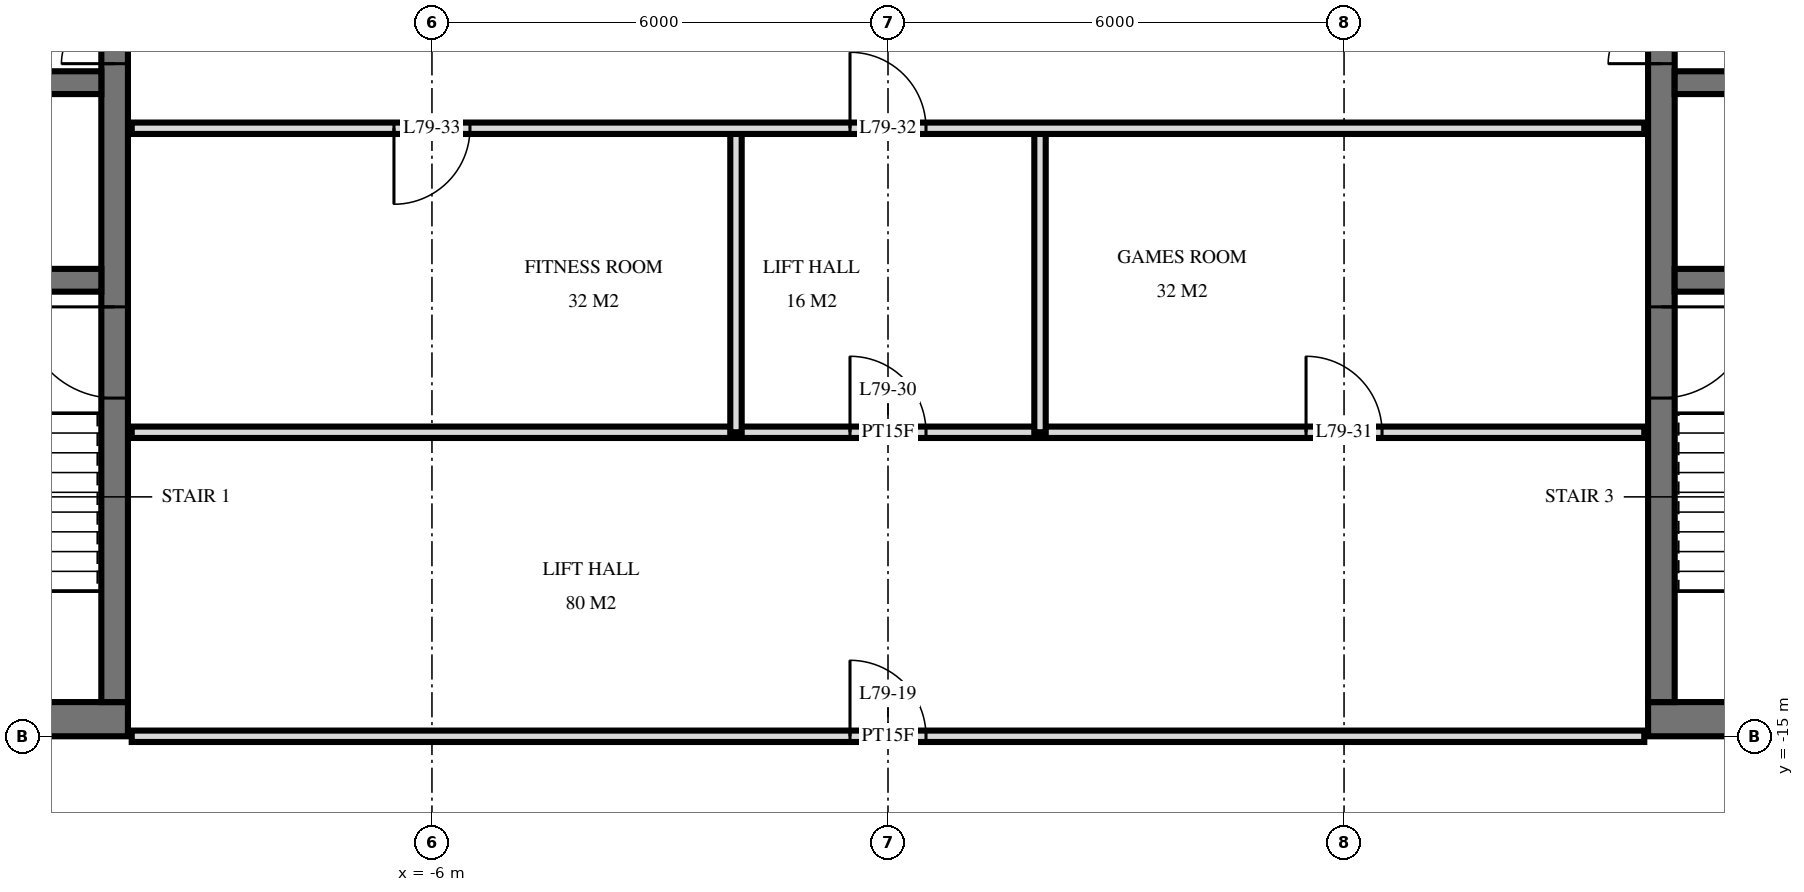
"""IFC4 building model, lengths in metres.
Left out: names, types, materials, properties, quantities, classifications, styles, units other than length and angle.
Written with IfcOpenShell. Run it as: python <this file> out.ifc"""

import sys

from ifc_helpers import new_model, si_unit, direction, frame, frame_2d, origin, place, context, subcontext, project, spatial, rectangle, extrude, element, fill, save


model = new_model("IFC4")
c1 = context("Model", 3, precision=1e-05, world=origin(), true_north=direction((0.0, 1.0)))
c2 = subcontext(c1, "Body", "Model", "MODEL_VIEW")
j1 = project(units=[si_unit("LENGTHUNIT", "METRE"), si_unit("PLANEANGLEUNIT", "RADIAN")], contexts=[c1])
p1 = place(None, origin())
s1 = spatial("IfcSite", under=j1, at=p1, CompositionType="ELEMENT")
p2 = place(p1, origin())
s2 = spatial("IfcBuilding", under=s1, at=p2, CompositionType="ELEMENT")
p3 = place(p2, frame((0.0, 0.0, 298.1)))
s3 = spatial("IfcBuildingStorey", under=s2, at=p3, CompositionType="ELEMENT", Elevation=298.1)
p4 = place(p3, frame((-19.5, -14.775, 0.0), z_axis=(0.0, 0.0, 1.0), x_axis=(1.0, 0.0, 0.0)))
e1 = element("IfcWall", 1, at=p4, inside=s3, PredefinedType="SHEAR", context=c2, shape_type="SweptSolid", body=[
    extrude(rectangle(XDim=9.5, YDim=0.45, at=frame_2d((4.75, 0.0))), origin(), (0.0, 0.0, 1.0), 3.5),
])
p5 = place(p4, frame((1.2, 0.0, 0.0)))
e2 = element("IfcOpeningElement", 2, at=p5, cuts=e1, PredefinedType="OPENING", context=c2, shape_type="SweptSolid", body=[
    extrude(rectangle(XDim=1.2, YDim=2.1, at=frame_2d((0.6, 1.05))), frame((0.0, 0.235, 0.0), z_axis=(0.0, -1.0, 0.0), x_axis=(1.0, 0.0, 0.0)), (0.0, 0.0, 1.0), 0.47),
])
p6 = place(p4, frame((4.25, 0.0, 0.0)))
e3 = element("IfcOpeningElement", 3, at=p6, cuts=e1, PredefinedType="OPENING", context=c2, shape_type="SweptSolid", body=[
    extrude(rectangle(XDim=1.1, YDim=2.1, at=frame_2d((0.55, 1.05))), frame((0.0, 0.235, 0.0), z_axis=(0.0, -1.0, 0.0), x_axis=(1.0, 0.0, 0.0)), (0.0, 0.0, 1.0), 0.47),
])
p7 = place(p3, frame((-10.175, -14.55, 0.0), z_axis=(0.0, 0.0, 1.0), x_axis=(0.0, 1.0, 0.0)))
e4 = element("IfcWall", 4, at=p7, inside=s3, PredefinedType="SHEAR", context=c2, shape_type="SweptSolid", body=[
    extrude(rectangle(XDim=14.1, YDim=0.35, at=frame_2d((7.05, 0.0))), origin(), (0.0, 0.0, 1.0), 3.5),
])
p8 = place(p7, frame((8.4, 0.0, 0.0)))
e5 = element("IfcOpeningElement", 5, at=p8, cuts=e4, PredefinedType="OPENING", context=c2, shape_type="SweptSolid", body=[
    extrude(rectangle(XDim=1.4, YDim=2.4, at=frame_2d((0.7, 1.2))), frame((0.0, 0.185, 0.0), z_axis=(0.0, -1.0, 0.0), x_axis=(1.0, 0.0, 0.0)), (0.0, 0.0, 1.0), 0.37),
])
p9 = place(p7, frame((10.0, 0.0, 0.0)))
e6 = element("IfcOpeningElement", 6, at=p9, cuts=e4, PredefinedType="OPENING", context=c2, shape_type="SweptSolid", body=[
    extrude(rectangle(XDim=1.4, YDim=2.4, at=frame_2d((0.7, 1.2))), frame((0.0, 0.185, 0.0), z_axis=(0.0, -1.0, 0.0), x_axis=(1.0, 0.0, 0.0)), (0.0, 0.0, 1.0), 0.37),
])
p10 = place(p7, frame((4.0, 0.0, 0.0)))
e7 = element("IfcOpeningElement", 7, at=p10, cuts=e4, PredefinedType="OPENING", context=c2, shape_type="SweptSolid", body=[
    extrude(rectangle(XDim=1.2, YDim=2.1, at=frame_2d((0.6, 1.05))), frame((0.0, 0.185, 0.0), z_axis=(0.0, -1.0, 0.0), x_axis=(1.0, 0.0, 0.0)), (0.0, 0.0, 1.0), 0.37),
])
p11 = place(p3, frame((-19.05, -6.4, 0.0), z_axis=(0.0, 0.0, 1.0), x_axis=(1.0, 0.0, 0.0)))
e8 = element("IfcWall", 8, at=p11, inside=s3, PredefinedType="SHEAR", context=c2, shape_type="SweptSolid", body=[
    extrude(rectangle(XDim=8.7, YDim=0.3, at=frame_2d((4.35, 0.0))), origin(), (0.0, 0.0, 1.0), 3.5),
])
p12 = place(p11, frame((0.8, 0.0, 0.0)))
e9 = element("IfcOpeningElement", 9, at=p12, cuts=e8, PredefinedType="OPENING", context=c2, shape_type="SweptSolid", body=[
    extrude(rectangle(XDim=1.1, YDim=2.1, at=frame_2d((0.55, 1.05))), frame((0.0, 0.16, 0.0), z_axis=(0.0, -1.0, 0.0), x_axis=(1.0, 0.0, 0.0)), (0.0, 0.0, 1.0), 0.32),
])
p13 = place(p3, frame((-19.05, -9.0, 0.0), z_axis=(0.0, 0.0, 1.0), x_axis=(1.0, 0.0, 0.0)))
e10 = element("IfcWall", 10, at=p13, inside=s3, PredefinedType="SHEAR", context=c2, shape_type="SweptSolid", body=[
    extrude(rectangle(XDim=8.7, YDim=0.3, at=frame_2d((4.35, 0.0))), origin(), (0.0, 0.0, 1.0), 3.5),
])
p14 = place(p13, frame((3.8, 0.0, 0.0)))
e11 = element("IfcOpeningElement", 11, at=p14, cuts=e10, PredefinedType="OPENING", context=c2, shape_type="SweptSolid", body=[
    extrude(rectangle(XDim=1.1, YDim=2.1, at=frame_2d((0.55, 1.05))), frame((0.0, 0.16, 0.0), z_axis=(0.0, -1.0, 0.0), x_axis=(1.0, 0.0, 0.0)), (0.0, 0.0, 1.0), 0.32),
])
p15 = place(p3, frame((10.0, -14.775, 0.0), z_axis=(0.0, 0.0, 1.0), x_axis=(1.0, 0.0, 0.0)))
e12 = element("IfcWall", 12, at=p15, inside=s3, PredefinedType="SHEAR", context=c2, shape_type="SweptSolid", body=[
    extrude(rectangle(XDim=9.5, YDim=0.45, at=frame_2d((4.75, 0.0))), origin(), (0.0, 0.0, 1.0), 3.5),
])
p16 = place(p15, frame((7.1, 0.0, 0.0)))
e13 = element("IfcOpeningElement", 13, at=p16, cuts=e12, PredefinedType="OPENING", context=c2, shape_type="SweptSolid", body=[
    extrude(rectangle(XDim=1.2, YDim=2.1, at=frame_2d((0.6, 1.05))), frame((0.0, 0.235, 0.0), z_axis=(0.0, -1.0, 0.0), x_axis=(1.0, 0.0, 0.0)), (0.0, 0.0, 1.0), 0.47),
])
p17 = place(p15, frame((4.15, 0.0, 0.0)))
e14 = element("IfcOpeningElement", 14, at=p17, cuts=e12, PredefinedType="OPENING", context=c2, shape_type="SweptSolid", body=[
    extrude(rectangle(XDim=1.1, YDim=2.1, at=frame_2d((0.55, 1.05))), frame((0.0, 0.235, 0.0), z_axis=(0.0, -1.0, 0.0), x_axis=(1.0, 0.0, 0.0)), (0.0, 0.0, 1.0), 0.47),
])
p18 = place(p3, frame((10.175, -14.55, 0.0), z_axis=(0.0, 0.0, 1.0), x_axis=(0.0, 1.0, 0.0)))
e15 = element("IfcWall", 15, at=p18, inside=s3, PredefinedType="SHEAR", context=c2, shape_type="SweptSolid", body=[
    extrude(rectangle(XDim=14.1, YDim=0.35, at=frame_2d((7.05, 0.0))), origin(), (0.0, 0.0, 1.0), 3.5),
])
p19 = place(p18, frame((8.4, 0.0, 0.0)))
e16 = element("IfcOpeningElement", 16, at=p19, cuts=e15, PredefinedType="OPENING", context=c2, shape_type="SweptSolid", body=[
    extrude(rectangle(XDim=1.4, YDim=2.4, at=frame_2d((0.7, 1.2))), frame((0.0, 0.185, 0.0), z_axis=(0.0, -1.0, 0.0), x_axis=(1.0, 0.0, 0.0)), (0.0, 0.0, 1.0), 0.37),
])
p20 = place(p18, frame((10.0, 0.0, 0.0)))
e17 = element("IfcOpeningElement", 17, at=p20, cuts=e15, PredefinedType="OPENING", context=c2, shape_type="SweptSolid", body=[
    extrude(rectangle(XDim=1.4, YDim=2.4, at=frame_2d((0.7, 1.2))), frame((0.0, 0.185, 0.0), z_axis=(0.0, -1.0, 0.0), x_axis=(1.0, 0.0, 0.0)), (0.0, 0.0, 1.0), 0.37),
])
p21 = place(p18, frame((4.0, 0.0, 0.0)))
e18 = element("IfcOpeningElement", 18, at=p21, cuts=e15, PredefinedType="OPENING", context=c2, shape_type="SweptSolid", body=[
    extrude(rectangle(XDim=1.2, YDim=2.1, at=frame_2d((0.6, 1.05))), frame((0.0, 0.185, 0.0), z_axis=(0.0, -1.0, 0.0), x_axis=(1.0, 0.0, 0.0)), (0.0, 0.0, 1.0), 0.37),
])
p22 = place(p3, frame((10.35, -6.4, 0.0), z_axis=(0.0, 0.0, 1.0), x_axis=(1.0, 0.0, 0.0)))
e19 = element("IfcWall", 19, at=p22, inside=s3, PredefinedType="SHEAR", context=c2, shape_type="SweptSolid", body=[
    extrude(rectangle(XDim=8.7, YDim=0.3, at=frame_2d((4.35, 0.0))), origin(), (0.0, 0.0, 1.0), 3.5),
])
p23 = place(p22, frame((6.8, 0.0, 0.0)))
e20 = element("IfcOpeningElement", 20, at=p23, cuts=e19, PredefinedType="OPENING", context=c2, shape_type="SweptSolid", body=[
    extrude(rectangle(XDim=1.1, YDim=2.1, at=frame_2d((0.55, 1.05))), frame((0.0, 0.16, 0.0), z_axis=(0.0, -1.0, 0.0), x_axis=(1.0, 0.0, 0.0)), (0.0, 0.0, 1.0), 0.32),
])
p24 = place(p3, frame((10.35, -9.0, 0.0), z_axis=(0.0, 0.0, 1.0), x_axis=(1.0, 0.0, 0.0)))
e21 = element("IfcWall", 21, at=p24, inside=s3, PredefinedType="SHEAR", context=c2, shape_type="SweptSolid", body=[
    extrude(rectangle(XDim=8.7, YDim=0.3, at=frame_2d((4.35, 0.0))), origin(), (0.0, 0.0, 1.0), 3.5),
])
p25 = place(p24, frame((3.8, 0.0, 0.0)))
e22 = element("IfcOpeningElement", 22, at=p25, cuts=e21, PredefinedType="OPENING", context=c2, shape_type="SweptSolid", body=[
    extrude(rectangle(XDim=1.1, YDim=2.1, at=frame_2d((0.55, 1.05))), frame((0.0, 0.16, 0.0), z_axis=(0.0, -1.0, 0.0), x_axis=(1.0, 0.0, 0.0)), (0.0, 0.0, 1.0), 0.32),
])
for number, where, z_axis, x_axis in (
    (23, (2.0, -11.0, 0.0), (0.0, 0.0, 1.0), (0.0, 1.0, 0.0)),
    (24, (-2.0, -11.0, 0.0), (0.0, 0.0, 1.0), (0.0, 1.0, 0.0)),
):
    element("IfcWall", number, at=place(p3, frame(where, z_axis=z_axis, x_axis=x_axis)), inside=s3, PredefinedType="PARTITIONING", context=c2, shape_type="SweptSolid", body=[
        extrude(rectangle(XDim=4.0, YDim=0.15, at=frame_2d((2.0, 0.0))), origin(), (0.0, 0.0, 1.0), 3.22),
    ])
p26 = place(p3, frame((-9.95, -15.0, 0.0), z_axis=(0.0, 0.0, 1.0), x_axis=(1.0, 0.0, 0.0)))
e25 = element("IfcWall", 25, at=p26, inside=s3, PredefinedType="PARTITIONING", context=c2, shape_type="SweptSolid", body=[
    extrude(rectangle(XDim=19.9, YDim=0.15, at=frame_2d((9.95, 0.0))), origin(), (0.0, 0.0, 1.0), 2.584),
])
p27 = place(p26, frame((9.45, 0.0, 0.0)))
e26 = element("IfcOpeningElement", 26, at=p27, cuts=e25, PredefinedType="OPENING", context=c2, shape_type="SweptSolid", body=[
    extrude(rectangle(XDim=1.0, YDim=2.1, at=frame_2d((0.5, 1.05))), frame((0.0, 0.085, 0.0), z_axis=(0.0, -1.0, 0.0), x_axis=(1.0, 0.0, 0.0)), (0.0, 0.0, 1.0), 0.17),
])
p28 = place(p3, frame((-9.95, -11.0, 0.0), z_axis=(0.0, 0.0, 1.0), x_axis=(1.0, 0.0, 0.0)))
e27 = element("IfcWall", 27, at=p28, inside=s3, PredefinedType="PARTITIONING", context=c2, shape_type="SweptSolid", body=[
    extrude(rectangle(XDim=19.9, YDim=0.15, at=frame_2d((9.95, 0.0))), origin(), (0.0, 0.0, 1.0), 3.22),
])
p29 = place(p28, frame((9.45, 0.0, 0.0)))
e28 = element("IfcOpeningElement", 28, at=p29, cuts=e27, PredefinedType="OPENING", context=c2, shape_type="SweptSolid", body=[
    extrude(rectangle(XDim=1.0, YDim=2.1, at=frame_2d((0.5, 1.05))), frame((0.0, 0.085, 0.0), z_axis=(0.0, -1.0, 0.0), x_axis=(1.0, 0.0, 0.0)), (0.0, 0.0, 1.0), 0.17),
])
p30 = place(p28, frame((15.45, 0.0, 0.0)))
e29 = element("IfcOpeningElement", 29, at=p30, cuts=e27, PredefinedType="OPENING", context=c2, shape_type="SweptSolid", body=[
    extrude(rectangle(XDim=1.0, YDim=2.1, at=frame_2d((0.5, 1.05))), frame((0.0, 0.085, 0.0), z_axis=(0.0, -1.0, 0.0), x_axis=(1.0, 0.0, 0.0)), (0.0, 0.0, 1.0), 0.17),
])
p31 = place(p3, frame((-9.95, -7.0, 0.0), z_axis=(0.0, 0.0, 1.0), x_axis=(1.0, 0.0, 0.0)))
e30 = element("IfcWall", 30, at=p31, inside=s3, PredefinedType="PARTITIONING", context=c2, shape_type="SweptSolid", body=[
    extrude(rectangle(XDim=19.9, YDim=0.15, at=frame_2d((9.95, 0.0))), origin(), (0.0, 0.0, 1.0), 3.22),
])
p32 = place(p31, frame((9.45, 0.0, 0.0)))
e31 = element("IfcOpeningElement", 31, at=p32, cuts=e30, PredefinedType="OPENING", context=c2, shape_type="SweptSolid", body=[
    extrude(rectangle(XDim=1.0, YDim=2.1, at=frame_2d((0.5, 1.05))), frame((0.0, 0.085, 0.0), z_axis=(0.0, -1.0, 0.0), x_axis=(1.0, 0.0, 0.0)), (0.0, 0.0, 1.0), 0.17),
])
p33 = place(p31, frame((3.45, 0.0, 0.0)))
e32 = element("IfcOpeningElement", 32, at=p33, cuts=e30, PredefinedType="OPENING", context=c2, shape_type="SweptSolid", body=[
    extrude(rectangle(XDim=1.0, YDim=2.1, at=frame_2d((0.5, 1.05))), frame((0.0, 0.085, 0.0), z_axis=(0.0, -1.0, 0.0), x_axis=(1.0, 0.0, 0.0)), (0.0, 0.0, 1.0), 0.17),
])
p34 = place(p8, origin())
e33 = element("IfcDoor", 33, at=p34, inside=s3, OperationType="DOUBLE_DOOR_SINGLE_SWING", PredefinedType="DOOR", context=c2, shape_type="SweptSolid", body=[
    extrude(rectangle(XDim=1.4, YDim=2.4, at=frame_2d((0.7, 1.2))), frame((0.0, 0.025, 0.0), z_axis=(0.0, -1.0, 0.0), x_axis=(1.0, 0.0, 0.0)), (0.0, 0.0, 1.0), 0.05),
])
fill(e5, e33)
p35 = place(p10, origin())
e34 = element("IfcDoor", 34, at=p35, inside=s3, OperationType="SINGLE_SWING_LEFT", PredefinedType="DOOR", context=c2, shape_type="SweptSolid", body=[
    extrude(rectangle(XDim=1.2, YDim=2.1, at=frame_2d((0.6, 1.05))), frame((0.0, 0.025, 0.0), z_axis=(0.0, -1.0, 0.0), x_axis=(1.0, 0.0, 0.0)), (0.0, 0.0, 1.0), 0.05),
])
fill(e7, e34)
p36 = place(p19, origin())
e35 = element("IfcDoor", 35, at=p36, inside=s3, OperationType="DOUBLE_DOOR_SINGLE_SWING", PredefinedType="DOOR", context=c2, shape_type="SweptSolid", body=[
    extrude(rectangle(XDim=1.4, YDim=2.4, at=frame_2d((0.7, 1.2))), frame((0.0, 0.025, 0.0), z_axis=(0.0, -1.0, 0.0), x_axis=(1.0, 0.0, 0.0)), (0.0, 0.0, 1.0), 0.05),
])
fill(e16, e35)
p37 = place(p21, frame((0.6, 0.0, 0.0), z_axis=(0.0, 0.0, 1.0), x_axis=(-1.0, 0.0, 0.0)))
e36 = element("IfcDoor", 36, at=p37, inside=s3, OperationType="SINGLE_SWING_RIGHT", PredefinedType="DOOR", context=c2, shape_type="SweptSolid", body=[
    extrude(rectangle(XDim=1.2, YDim=2.1, at=frame_2d((0.0, 1.05))), frame((0.0, -0.025, 0.0), z_axis=(0.0, 1.0, 0.0), x_axis=(-1.0, 0.0, 0.0)), (0.0, 0.0, 1.0), 0.05),
])
fill(e18, e36)
p38 = place(p27, origin())
e37 = element("IfcDoor", 37, at=p38, inside=s3, OperationType="SINGLE_SWING_RIGHT", PredefinedType="DOOR", context=c2, shape_type="SweptSolid", body=[
    extrude(rectangle(XDim=1.0, YDim=2.1, at=frame_2d((0.5, 1.05))), frame((0.0, 0.025, 0.0), z_axis=(0.0, -1.0, 0.0), x_axis=(1.0, 0.0, 0.0)), (0.0, 0.0, 1.0), 0.05),
])
fill(e26, e37)
p39 = place(p29, origin())
e38 = element("IfcDoor", 38, at=p39, inside=s3, OperationType="SINGLE_SWING_RIGHT", PredefinedType="DOOR", context=c2, shape_type="SweptSolid", body=[
    extrude(rectangle(XDim=1.0, YDim=2.1, at=frame_2d((0.5, 1.05))), frame((0.0, 0.025, 0.0), z_axis=(0.0, -1.0, 0.0), x_axis=(1.0, 0.0, 0.0)), (0.0, 0.0, 1.0), 0.05),
])
fill(e28, e38)
p40 = place(p30, origin())
e39 = element("IfcDoor", 39, at=p40, inside=s3, OperationType="SINGLE_SWING_RIGHT", PredefinedType="DOOR", context=c2, shape_type="SweptSolid", body=[
    extrude(rectangle(XDim=1.0, YDim=2.1, at=frame_2d((0.5, 1.05))), frame((0.0, 0.025, 0.0), z_axis=(0.0, -1.0, 0.0), x_axis=(1.0, 0.0, 0.0)), (0.0, 0.0, 1.0), 0.05),
])
fill(e29, e39)
p41 = place(p32, origin())
e40 = element("IfcDoor", 40, at=p41, inside=s3, OperationType="SINGLE_SWING_RIGHT", PredefinedType="DOOR", context=c2, shape_type="SweptSolid", body=[
    extrude(rectangle(XDim=1.0, YDim=2.1, at=frame_2d((0.5, 1.05))), frame((0.0, 0.025, 0.0), z_axis=(0.0, -1.0, 0.0), x_axis=(1.0, 0.0, 0.0)), (0.0, 0.0, 1.0), 0.05),
])
fill(e31, e40)
p42 = place(p33, frame((0.5, 0.0, 0.0), z_axis=(0.0, 0.0, 1.0), x_axis=(-1.0, 0.0, 0.0)))
e41 = element("IfcDoor", 41, at=p42, inside=s3, OperationType="SINGLE_SWING_LEFT", PredefinedType="DOOR", context=c2, shape_type="SweptSolid", body=[
    extrude(rectangle(XDim=1.0, YDim=2.1, at=frame_2d((0.0, 1.05))), frame((0.0, -0.025, 0.0), z_axis=(0.0, 1.0, 0.0), x_axis=(-1.0, 0.0, 0.0)), (0.0, 0.0, 1.0), 0.05),
])
fill(e32, e41)
save(model, sys.argv[1])
